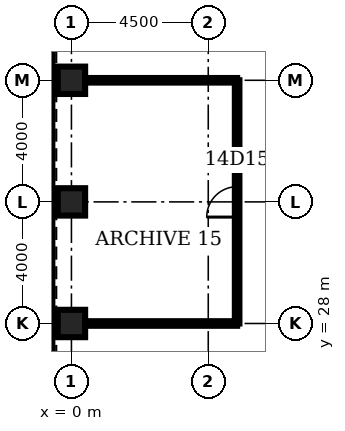
"""IFC4 building model, lengths in metres.
Left out: names, types, materials, properties, quantities, classifications, styles, units other than length and angle.
Written with IfcOpenShell. Run it as: python <this file> out.ifc"""

import sys

from ifc_helpers import new_model, si_unit, direction, frame, frame_2d, origin, origin_2d, place, context, subcontext, project, spatial, rectangle, hollow_rectangle, extrude, element, fill, save


model = new_model("IFC4")
c1 = context("Model", 3, precision=1e-05, world=origin(), true_north=direction((0.0, 1.0)))
c2 = subcontext(c1, "Body", "Model", "MODEL_VIEW")
j1 = project(units=[si_unit("LENGTHUNIT", "METRE"), si_unit("PLANEANGLEUNIT", "RADIAN")], contexts=[c1])
p1 = place(None, origin())
s1 = spatial("IfcSite", under=j1, at=p1, CompositionType="ELEMENT")
p2 = place(p1, origin())
s2 = spatial("IfcBuilding", under=s1, at=p2, CompositionType="ELEMENT")
p3 = place(p2, frame((0.0, 0.0, 68.0)))
s3 = spatial("IfcBuildingStorey", under=s2, at=p3, CompositionType="ELEMENT", Elevation=68.0)
for number, where, z_axis, x_axis in (
    (1, (0.0, 36.0, 0.0), (0.0, 0.0, 1.0), (1.0, 0.0, 0.0)),
    (2, (0.0, 32.0, 0.0), (0.0, 0.0, 1.0), (1.0, 0.0, 0.0)),
    (3, (0.0, 28.0, 0.0), (0.0, 0.0, 1.0), (1.0, 0.0, 0.0)),
):
    element("IfcColumn", number, at=place(p3, frame(where, z_axis=z_axis, x_axis=x_axis)), inside=s3, PredefinedType="COLUMN", context=c2, shape_type="SweptSolid", body=[
        extrude(hollow_rectangle(XDim=0.9, YDim=0.9, WallThickness=0.12, at=origin_2d()), origin(), (0.0, 0.0, 1.0), 4.5),
    ])
for number, where, z_axis, x_axis in (
    (4, (0.45, 28.0, 0.0), (0.0, 0.0, 1.0), (1.0, 0.0, 0.0)),
    (5, (0.45, 36.0, 0.0), (0.0, 0.0, 1.0), (1.0, 0.0, 0.0)),
):
    element("IfcWall", number, at=place(p3, frame(where, z_axis=z_axis, x_axis=x_axis)), inside=s3, PredefinedType="PARTITIONING", context=c2, shape_type="SweptSolid", body=[
        extrude(rectangle(XDim=5.0, YDim=0.15, at=frame_2d((2.5, 0.0))), origin(), (0.0, 0.0, 1.0), 3.0),
    ])
p4 = place(p3, frame((5.45, 28.0, 0.0), z_axis=(0.0, 0.0, 1.0), x_axis=(0.0, 1.0, 0.0)))
e6 = element("IfcWall", 6, at=p4, inside=s3, PredefinedType="PARTITIONING", context=c2, shape_type="SweptSolid", body=[
    extrude(rectangle(XDim=8.0, YDim=0.15, at=frame_2d((4.0, 0.0))), origin(), (0.0, 0.0, 1.0), 3.0),
])
p5 = place(p4, frame((3.5, 0.0, 0.0)))
e7 = element("IfcOpeningElement", 7, at=p5, cuts=e6, PredefinedType="OPENING", context=c2, shape_type="SweptSolid", body=[
    extrude(rectangle(XDim=1.0, YDim=2.1, at=frame_2d((0.5, 1.05))), frame((0.0, 0.085, 0.0), z_axis=(0.0, -1.0, 0.0), x_axis=(1.0, 0.0, 0.0)), (0.0, 0.0, 1.0), 0.17),
])
p6 = place(p5, origin())
e8 = element("IfcDoor", 8, at=p6, inside=s3, OperationType="SINGLE_SWING_LEFT", PredefinedType="DOOR", context=c2, shape_type="SweptSolid", body=[
    extrude(rectangle(XDim=1.0, YDim=2.1, at=frame_2d((0.5, 1.05))), frame((0.0, 0.025, 0.0), z_axis=(0.0, -1.0, 0.0), x_axis=(1.0, 0.0, 0.0)), (0.0, 0.0, 1.0), 0.05),
])
fill(e7, e8)
save(model, sys.argv[1])
